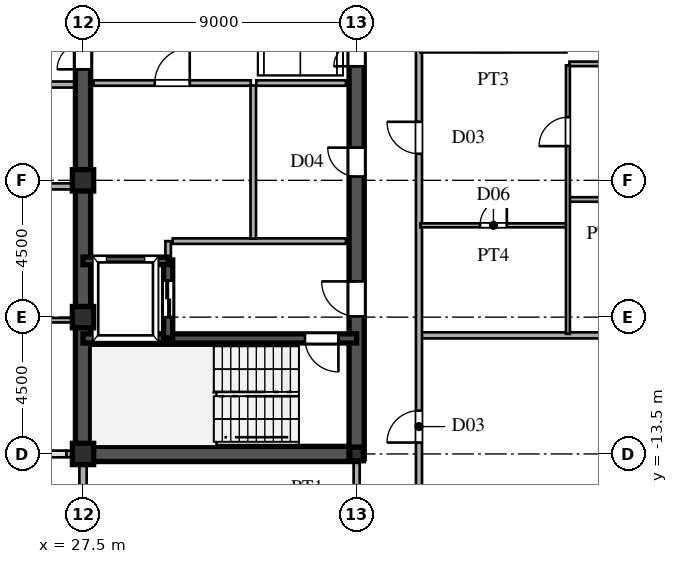
"""IFC4 building model, lengths in metres.
Left out: names, types, materials, properties, quantities, classifications, styles, units other than length and angle.
Written with IfcOpenShell. Run it as: python <this file> out.ifc"""

import sys

from ifc_helpers import new_model, si_unit, direction, frame, frame_2d, origin, origin_2d, place, context, subcontext, project, spatial, rectangle, hollow_rectangle, i_section, extrude, source, transform, mapped, element, fill, save


model = new_model("IFC4")
c1 = context("Model", 3, precision=1e-05, world=origin(), true_north=direction((0.0, 1.0)))
c2 = subcontext(c1, "Body", "Model", "MODEL_VIEW")
j1 = project(units=[si_unit("LENGTHUNIT", "METRE"), si_unit("PLANEANGLEUNIT", "RADIAN")], contexts=[c1])
p1 = place(None, origin())
s1 = spatial("IfcSite", under=j1, at=p1, CompositionType="ELEMENT")
p2 = place(p1, origin())
s2 = spatial("IfcBuilding", under=s1, at=p2, CompositionType="ELEMENT")
p3 = place(p2, frame((0.0, 0.0, 265.65)))
s3 = spatial("IfcBuildingStorey", under=s2, at=p3, CompositionType="ELEMENT", Elevation=265.65)
m1 = source(origin(), c2, "Body", "SweptSolid", [
    extrude(hollow_rectangle(XDim=0.7, YDim=0.7, WallThickness=0.03, at=origin_2d()), origin(), (0.0, 0.0, 1.0), 3.75),
])
for number, where, z_axis, x_axis in (
    (1, (27.5, -13.5, 0.0), (0.0, 0.0, 1.0), (1.0, 0.0, 0.0)),
    (2, (27.5, -9.0, 0.0), (0.0, 0.0, 1.0), (1.0, 0.0, 0.0)),
    (3, (27.5, -4.5, 0.0), (0.0, 0.0, 1.0), (1.0, 0.0, 0.0)),
):
    element("IfcColumn", number, at=place(p3, frame(where, z_axis=z_axis, x_axis=x_axis)), inside=s3, PredefinedType="COLUMN", context=c2, shape_type="MappedRepresentation", body=[
        mapped(m1, transform((0.0, 0.0, 0.0), scale=1.0)),
    ])
m2 = source(origin(), c2, "Body", "SweptSolid", [
    extrude(i_section(OverallWidth=0.45, OverallDepth=0.45, WebThickness=0.016, FlangeThickness=0.025, at=origin_2d()), origin(), (0.0, 0.0, 1.0), 3.75),
])
p4 = place(p3, frame((36.5, -13.5, 0.0), z_axis=(0.0, 0.0, 1.0), x_axis=(1.0, 0.0, 0.0)))
e4 = element("IfcColumn", 4, at=p4, inside=s3, PredefinedType="COLUMN", context=c2, shape_type="MappedRepresentation", body=[
    mapped(m2, transform((0.0, 0.0, 0.0), scale=1.0)),
])
p5 = place(p3, frame((27.5, -15.98, 0.0), z_axis=(0.0, 0.0, 1.0), x_axis=(0.0, 1.0, 0.0)))
e5 = element("IfcWall", 5, at=p5, inside=s3, PredefinedType="SOLIDWALL", context=c2, shape_type="SweptSolid", body=[
    extrude(rectangle(XDim=1.605, YDim=0.24, at=frame_2d((0.803, 0.0))), origin(), (0.0, 0.0, 1.0), 3.49),
])
p6 = place(p3, frame((27.5, -14.375, 0.0), z_axis=(0.0, 0.0, 1.0), x_axis=(0.0, 1.0, 0.0)))
e6 = element("IfcWall", 6, at=p6, inside=s3, PredefinedType="SOLIDWALL", context=c2, shape_type="SweptSolid", body=[
    extrude(rectangle(XDim=0.62, YDim=0.24, at=frame_2d((0.31, 0.0))), origin(), (0.0, 0.0, 1.0), 2.99),
])
p7 = place(p3, frame((26.95, -13.5, 0.0), z_axis=(0.0, 0.0, 1.0), x_axis=(1.0, 0.0, 0.0)))
e7 = element("IfcWall", 7, at=p7, inside=s3, PredefinedType="SOLIDWALL", context=c2, shape_type="SweptSolid", body=[
    extrude(rectangle(XDim=0.54, YDim=0.21, at=frame_2d((0.27, 0.0))), origin(), (0.0, 0.0, 1.0), 2.99),
])
p8 = place(p3, frame((27.5, -13.5, 0.0), z_axis=(0.0, 0.0, 1.0), x_axis=(0.0, 1.0, 0.0)))
e8 = element("IfcWall", 8, at=p8, inside=s3, PredefinedType="SHEAR", context=c2, shape_type="SweptSolid", body=[
    extrude(rectangle(XDim=12.2, YDim=0.5, at=frame_2d((6.1, 0.0))), origin(), (0.0, 0.0, 1.0), 3.49),
])
p9 = place(p3, frame((27.5, -1.3, 0.0), z_axis=(0.0, 0.0, 1.0), x_axis=(0.0, 1.0, 0.0)))
e9 = element("IfcWall", 9, at=p9, inside=s3, PredefinedType="SHEAR", context=c2, shape_type="SweptSolid", body=[
    extrude(rectangle(XDim=2.6, YDim=0.5, at=frame_2d((1.3, 0.0))), origin(), (0.0, 0.0, 1.0), 3.49),
])
p10 = place(p9, frame((0.45, 0.0, 0.0)))
e10 = element("IfcOpeningElement", 10, at=p10, cuts=e9, PredefinedType="OPENING", context=c2, shape_type="SweptSolid", body=[
    extrude(rectangle(XDim=1.7, YDim=2.35, at=frame_2d((0.85, 1.175))), frame((0.0, 0.26, 0.0), z_axis=(0.0, -1.0, 0.0), x_axis=(1.0, 0.0, 0.0)), (0.0, 0.0, 1.0), 0.52),
])
p11 = place(p3, frame((27.5, -13.5, 0.0), z_axis=(0.0, 0.0, 1.0), x_axis=(1.0, 0.0, 0.0)))
e11 = element("IfcWall", 11, at=p11, inside=s3, PredefinedType="SHEAR", context=c2, shape_type="SweptSolid", body=[
    extrude(rectangle(XDim=9.0, YDim=0.5, at=frame_2d((4.5, 0.0))), origin(), (0.0, 0.0, 1.0), 3.49),
])
p12 = place(p3, frame((36.5, -13.65, 0.0), z_axis=(0.0, 0.0, 1.0), x_axis=(0.0, 1.0, 0.0)))
e12 = element("IfcWall", 12, at=p12, inside=s3, PredefinedType="SHEAR", context=c2, shape_type="SweptSolid", body=[
    extrude(rectangle(XDim=7.15, YDim=0.5, at=frame_2d((3.575, 0.0))), origin(), (0.0, 0.0, 1.0), 3.49),
])
p13 = place(p12, frame((4.675, 0.0, 0.0)))
e13 = element("IfcOpeningElement", 13, at=p13, cuts=e12, PredefinedType="OPENING", context=c2, shape_type="SweptSolid", body=[
    extrude(rectangle(XDim=1.15, YDim=2.2, at=frame_2d((0.575, 1.1))), frame((0.0, 0.26, 0.0), z_axis=(0.0, -1.0, 0.0), x_axis=(1.0, 0.0, 0.0)), (0.0, 0.0, 1.0), 0.52),
])
p14 = place(p3, frame((36.5, -1.3, 0.0), z_axis=(0.0, 0.0, 1.0), x_axis=(0.0, 1.0, 0.0)))
e14 = element("IfcWall", 14, at=p14, inside=s3, PredefinedType="SHEAR", context=c2, shape_type="SweptSolid", body=[
    extrude(rectangle(XDim=2.6, YDim=0.5, at=frame_2d((1.3, 0.0))), origin(), (0.0, 0.0, 1.0), 3.49),
])
p15 = place(p14, frame((0.55, 0.0, 0.0)))
e15 = element("IfcOpeningElement", 15, at=p15, cuts=e14, PredefinedType="OPENING", context=c2, shape_type="SweptSolid", body=[
    extrude(rectangle(XDim=1.5, YDim=2.3, at=frame_2d((0.75, 1.15))), frame((0.0, 0.26, 0.0), z_axis=(0.0, -1.0, 0.0), x_axis=(1.0, 0.0, 0.0)), (0.0, 0.0, 1.0), 0.52),
])
p16 = place(p3, frame((36.5, -6.5, 0.0), z_axis=(0.0, 0.0, 1.0), x_axis=(0.0, 1.0, 0.0)))
e16 = element("IfcWall", 16, at=p16, inside=s3, PredefinedType="SHEAR", context=c2, shape_type="SweptSolid", body=[
    extrude(rectangle(XDim=5.2, YDim=0.5, at=frame_2d((2.6, 0.0))), origin(), (0.0, 0.0, 1.0), 3.49),
])
p17 = place(p16, frame((2.125, 0.0, 0.0)))
e17 = element("IfcOpeningElement", 17, at=p17, cuts=e16, PredefinedType="OPENING", context=c2, shape_type="SweptSolid", body=[
    extrude(rectangle(XDim=0.95, YDim=2.15, at=frame_2d((0.475, 1.075))), frame((0.0, 0.26, 0.0), z_axis=(0.0, -1.0, 0.0), x_axis=(1.0, 0.0, 0.0)), (0.0, 0.0, 1.0), 0.52),
])
p18 = place(p3, frame((27.5, -9.7, 0.0), z_axis=(0.0, 0.0, 1.0), x_axis=(1.0, 0.0, 0.0)))
e18 = element("IfcWall", 18, at=p18, inside=s3, PredefinedType="SHEAR", context=c2, shape_type="SweptSolid", body=[
    extrude(rectangle(XDim=9.0, YDim=0.3, at=frame_2d((4.5, 0.0))), origin(), (0.0, 0.0, 1.0), 3.49),
])
p19 = place(p18, frame((7.3, 0.0, 0.0)))
e19 = element("IfcOpeningElement", 19, at=p19, cuts=e18, PredefinedType="OPENING", context=c2, shape_type="SweptSolid", body=[
    extrude(rectangle(XDim=1.1, YDim=2.2, at=frame_2d((0.55, 1.1))), frame((0.0, 0.16, 0.0), z_axis=(0.0, -1.0, 0.0), x_axis=(1.0, 0.0, 0.0)), (0.0, 0.0, 1.0), 0.32),
])
p20 = place(p3, frame((27.5, -7.15, 0.0), z_axis=(0.0, 0.0, 1.0), x_axis=(1.0, 0.0, 0.0)))
e20 = element("IfcWall", 20, at=p20, inside=s3, PredefinedType="SHEAR", context=c2, shape_type="SweptSolid", body=[
    extrude(rectangle(XDim=2.8, YDim=0.25, at=frame_2d((1.4, 0.0))), origin(), (0.0, 0.0, 1.0), 3.49),
])
p21 = place(p3, frame((30.3, -9.68, 0.0), z_axis=(0.0, 0.0, 1.0), x_axis=(0.0, 1.0, 0.0)))
e21 = element("IfcWall", 21, at=p21, inside=s3, PredefinedType="SHEAR", context=c2, shape_type="SweptSolid", body=[
    extrude(rectangle(XDim=2.56, YDim=0.3, at=frame_2d((1.28, 0.0))), origin(), (0.0, 0.0, 1.0), 3.49),
])
p22 = place(p21, frame((0.68, 0.0, 0.0)))
e22 = element("IfcOpeningElement", 22, at=p22, cuts=e21, PredefinedType="OPENING", context=c2, shape_type="SweptSolid", body=[
    extrude(rectangle(XDim=1.2, YDim=2.25, at=frame_2d((0.6, 1.125))), frame((0.0, 0.16, 0.0), z_axis=(0.0, -1.0, 0.0), x_axis=(1.0, 0.0, 0.0)), (0.0, 0.0, 1.0), 0.32),
])
p23 = place(p3, frame((30.45, -6.5, 0.0), z_axis=(0.0, 0.0, 1.0), x_axis=(1.0, 0.0, 0.0)))
e23 = element("IfcWall", 23, at=p23, inside=s3, PredefinedType="PARTITIONING", context=c2, shape_type="SweptSolid", body=[
    extrude(rectangle(XDim=5.7, YDim=0.18, at=frame_2d((2.85, 0.0))), origin(), (0.0, 0.0, 1.0), 3.49),
])
p24 = place(p3, frame((30.3, -7.12, 0.0), z_axis=(0.0, 0.0, 1.0), x_axis=(0.0, 1.0, 0.0)))
e24 = element("IfcWall", 24, at=p24, inside=s3, PredefinedType="PARTITIONING", context=c2, shape_type="SweptSolid", body=[
    extrude(rectangle(XDim=0.62, YDim=0.18, at=frame_2d((0.31, 0.0))), origin(), (0.0, 0.0, 1.0), 3.49),
])
p25 = place(p3, frame((33.1, -6.42, 0.0), z_axis=(0.0, 0.0, 1.0), x_axis=(0.0, 1.0, 0.0)))
e25 = element("IfcWall", 25, at=p25, inside=s3, PredefinedType="PARTITIONING", context=c2, shape_type="SweptSolid", body=[
    extrude(rectangle(XDim=5.04, YDim=0.18, at=frame_2d((2.52, 0.0))), origin(), (0.0, 0.0, 1.0), 3.49),
])
p26 = place(p3, frame((27.85, -1.3, 0.0), z_axis=(0.0, 0.0, 1.0), x_axis=(1.0, 0.0, 0.0)))
e26 = element("IfcWall", 26, at=p26, inside=s3, PredefinedType="PARTITIONING", context=c2, shape_type="SweptSolid", body=[
    extrude(rectangle(XDim=5.17, YDim=0.18, at=frame_2d((2.585, 0.0))), origin(), (0.0, 0.0, 1.0), 3.49),
])
p27 = place(p26, frame((2.01, 0.0, 0.0)))
e27 = element("IfcOpeningElement", 27, at=p27, cuts=e26, PredefinedType="OPENING", context=c2, shape_type="SweptSolid", body=[
    extrude(rectangle(XDim=1.15, YDim=2.2, at=frame_2d((0.575, 1.1))), frame((0.0, 0.1, 0.0), z_axis=(0.0, -1.0, 0.0), x_axis=(1.0, 0.0, 0.0)), (0.0, 0.0, 1.0), 0.2),
])
p28 = place(p3, frame((33.2, -1.3, 0.0), z_axis=(0.0, 0.0, 1.0), x_axis=(1.0, 0.0, 0.0)))
e28 = element("IfcWall", 28, at=p28, inside=s3, PredefinedType="PARTITIONING", context=c2, shape_type="SweptSolid", body=[
    extrude(rectangle(XDim=2.95, YDim=0.18, at=frame_2d((1.475, 0.0))), origin(), (0.0, 0.0, 1.0), 3.49),
])
p29 = place(p3, frame((38.63, -9.6, 0.0), z_axis=(0.0, 0.0, 1.0), x_axis=(1.0, 0.0, 0.0)))
e29 = element("IfcWall", 29, at=p29, inside=s3, PredefinedType="PARTITIONING", context=c2, shape_type="SweptSolid", body=[
    extrude(rectangle(XDim=15.38, YDim=0.2, at=frame_2d((7.69, 0.0))), origin(), (0.0, 0.0, 1.0), 3.49),
])
p30 = place(p3, frame((4.585, -9.1, 0.0), z_axis=(0.0, 0.0, 1.0), x_axis=(1.0, 0.0, 0.0)))
e30 = element("IfcWall", 30, at=p30, inside=s3, PredefinedType="PARTITIONING", context=c2, shape_type="SweptSolid", body=[
    extrude(rectangle(XDim=22.66, YDim=0.15, at=frame_2d((11.33, 0.0))), origin(), (0.0, 0.0, 1.0), 3.49),
])
p31 = place(p30, frame((3.94, 0.0, 0.0)))
e31 = element("IfcOpeningElement", 31, at=p31, cuts=e30, PredefinedType="OPENING", context=c2, shape_type="SweptSolid", body=[
    extrude(rectangle(XDim=0.95, YDim=2.15, at=frame_2d((0.475, 1.075))), frame((0.0, 0.085, 0.0), z_axis=(0.0, -1.0, 0.0), x_axis=(1.0, 0.0, 0.0)), (0.0, 0.0, 1.0), 0.17),
])
p32 = place(p30, frame((11.94, 0.0, 0.0)))
e32 = element("IfcOpeningElement", 32, at=p32, cuts=e30, PredefinedType="OPENING", context=c2, shape_type="SweptSolid", body=[
    extrude(rectangle(XDim=0.95, YDim=2.15, at=frame_2d((0.475, 1.075))), frame((0.0, 0.085, 0.0), z_axis=(0.0, -1.0, 0.0), x_axis=(1.0, 0.0, 0.0)), (0.0, 0.0, 1.0), 0.17),
])
p33 = place(p30, frame((18.94, 0.0, 0.0)))
e33 = element("IfcOpeningElement", 33, at=p33, cuts=e30, PredefinedType="OPENING", context=c2, shape_type="SweptSolid", body=[
    extrude(rectangle(XDim=0.95, YDim=2.15, at=frame_2d((0.475, 1.075))), frame((0.0, 0.085, 0.0), z_axis=(0.0, -1.0, 0.0), x_axis=(1.0, 0.0, 0.0)), (0.0, 0.0, 1.0), 0.17),
])
p34 = place(p3, frame((38.6, -5.98, 0.0), z_axis=(0.0, 0.0, 1.0), x_axis=(1.0, 0.0, 0.0)))
e34 = element("IfcWall", 34, at=p34, inside=s3, PredefinedType="PARTITIONING", context=c2, shape_type="SweptSolid", body=[
    extrude(rectangle(XDim=4.8, YDim=0.13, at=frame_2d((2.4, 0.0))), origin(), (0.0, 0.0, 1.0), 3.49),
])
p35 = place(p34, frame((1.96, 0.0, 0.0)))
e35 = element("IfcOpeningElement", 35, at=p35, cuts=e34, PredefinedType="OPENING", context=c2, shape_type="SweptSolid", body=[
    extrude(rectangle(XDim=0.88, YDim=2.1, at=frame_2d((0.44, 1.05))), frame((0.0, 0.075, 0.0), z_axis=(0.0, -1.0, 0.0), x_axis=(1.0, 0.0, 0.0)), (0.0, 0.0, 1.0), 0.15),
])
p36 = place(p3, frame((43.5, -5.13, 0.0), z_axis=(0.0, 0.0, 1.0), x_axis=(1.0, 0.0, 0.0)))
e36 = element("IfcWall", 36, at=p36, inside=s3, PredefinedType="PARTITIONING", context=c2, shape_type="SweptSolid", body=[
    extrude(rectangle(XDim=17.98, YDim=0.15, at=frame_2d((8.99, 0.0))), origin(), (0.0, 0.0, 1.0), 3.49),
])
p37 = place(p36, frame((5.0, 0.0, 0.0)))
e37 = element("IfcOpeningElement", 37, at=p37, cuts=e36, PredefinedType="OPENING", context=c2, shape_type="SweptSolid", body=[
    extrude(rectangle(XDim=0.95, YDim=2.15, at=frame_2d((0.475, 1.075))), frame((0.0, 0.085, 0.0), z_axis=(0.0, -1.0, 0.0), x_axis=(1.0, 0.0, 0.0)), (0.0, 0.0, 1.0), 0.17),
])
p38 = place(p3, frame((-27.245, -4.7, 0.0), z_axis=(0.0, 0.0, 1.0), x_axis=(1.0, 0.0, 0.0)))
e38 = element("IfcWall", 38, at=p38, inside=s3, PredefinedType="PARTITIONING", context=c2, shape_type="SweptSolid", body=[
    extrude(rectangle(XDim=54.49, YDim=0.2, at=frame_2d((27.245, 0.0))), origin(), (0.0, 0.0, 1.0), 3.49),
])
p39 = place(p38, frame((22.47, 0.0, 0.0)))
e39 = element("IfcOpeningElement", 39, at=p39, cuts=e38, PredefinedType="OPENING", context=c2, shape_type="SweptSolid", body=[
    extrude(rectangle(XDim=1.05, YDim=2.25, at=frame_2d((0.525, 1.125))), frame((0.0, 0.11, 0.0), z_axis=(0.0, -1.0, 0.0), x_axis=(1.0, 0.0, 0.0)), (0.0, 0.0, 1.0), 0.22),
])
p40 = place(p3, frame((6.885, -1.35, 0.0), z_axis=(0.0, 0.0, 1.0), x_axis=(1.0, 0.0, 0.0)))
e40 = element("IfcWall", 40, at=p40, inside=s3, PredefinedType="PARTITIONING", context=c2, shape_type="SweptSolid", body=[
    extrude(rectangle(XDim=20.36, YDim=0.2, at=frame_2d((10.18, 0.0))), origin(), (0.0, 0.0, 1.0), 3.49),
])
p41 = place(p40, frame((6.34, 0.0, 0.0)))
e41 = element("IfcOpeningElement", 41, at=p41, cuts=e40, PredefinedType="OPENING", context=c2, shape_type="SweptSolid", body=[
    extrude(rectangle(XDim=1.05, YDim=2.25, at=frame_2d((0.525, 1.125))), frame((0.0, 0.11, 0.0), z_axis=(0.0, -1.0, 0.0), x_axis=(1.0, 0.0, 0.0)), (0.0, 0.0, 1.0), 0.22),
])
p42 = place(p3, frame((43.5, -0.67, 0.0), z_axis=(0.0, 0.0, 1.0), x_axis=(1.0, 0.0, 0.0)))
e42 = element("IfcWall", 42, at=p42, inside=s3, PredefinedType="PARTITIONING", context=c2, shape_type="SweptSolid", body=[
    extrude(rectangle(XDim=24.035, YDim=0.15, at=frame_2d((12.018, 0.0))), origin(), (0.0, 0.0, 1.0), 3.49),
])
p43 = place(p42, frame((5.0, 0.0, 0.0)))
e43 = element("IfcOpeningElement", 43, at=p43, cuts=e42, PredefinedType="OPENING", context=c2, shape_type="SweptSolid", body=[
    extrude(rectangle(XDim=0.95, YDim=2.15, at=frame_2d((0.475, 1.075))), frame((0.0, 0.085, 0.0), z_axis=(0.0, -1.0, 0.0), x_axis=(1.0, 0.0, 0.0)), (0.0, 0.0, 1.0), 0.17),
])
p44 = place(p3, frame((36.5, -15.515, 0.0), z_axis=(0.0, 0.0, 1.0), x_axis=(0.0, 1.0, 0.0)))
e44 = element("IfcWall", 44, at=p44, inside=s3, PredefinedType="PARTITIONING", context=c2, shape_type="SweptSolid", body=[
    extrude(rectangle(XDim=1.76, YDim=0.2, at=frame_2d((0.88, 0.0))), origin(), (0.0, 0.0, 1.0), 2.89),
])
p45 = place(p3, frame((38.55, -15.515, 0.0), z_axis=(0.0, 0.0, 1.0), x_axis=(0.0, 1.0, 0.0)))
e45 = element("IfcWall", 45, at=p45, inside=s3, PredefinedType="PARTITIONING", context=c2, shape_type="SweptSolid", body=[
    extrude(rectangle(XDim=31.03, YDim=0.2, at=frame_2d((15.515, 0.0))), origin(), (0.0, 0.0, 1.0), 3.49),
])
p46 = place(p45, frame((2.39, 0.0, 0.0)))
e46 = element("IfcOpeningElement", 46, at=p46, cuts=e45, PredefinedType="OPENING", context=c2, shape_type="SweptSolid", body=[
    extrude(rectangle(XDim=1.05, YDim=2.25, at=frame_2d((0.525, 1.125))), frame((0.0, 0.11, 0.0), z_axis=(0.0, -1.0, 0.0), x_axis=(1.0, 0.0, 0.0)), (0.0, 0.0, 1.0), 0.22),
])
p47 = place(p45, frame((11.889, 0.0, 0.0)))
e47 = element("IfcOpeningElement", 47, at=p47, cuts=e45, PredefinedType="OPENING", context=c2, shape_type="SweptSolid", body=[
    extrude(rectangle(XDim=1.05, YDim=2.25, at=frame_2d((0.525, 1.125))), frame((0.0, 0.11, 0.0), z_axis=(0.0, -1.0, 0.0), x_axis=(1.0, 0.0, 0.0)), (0.0, 0.0, 1.0), 0.22),
])
p48 = place(p45, frame((24.69, 0.0, 0.0)))
e48 = element("IfcOpeningElement", 48, at=p48, cuts=e45, PredefinedType="OPENING", context=c2, shape_type="SweptSolid", body=[
    extrude(rectangle(XDim=1.05, YDim=2.25, at=frame_2d((0.525, 1.125))), frame((0.0, 0.11, 0.0), z_axis=(0.0, -1.0, 0.0), x_axis=(1.0, 0.0, 0.0)), (0.0, 0.0, 1.0), 0.22),
])
p49 = place(p3, frame((43.45, -9.55, 0.0), z_axis=(0.0, 0.0, 1.0), x_axis=(0.0, 1.0, 0.0)))
e49 = element("IfcWall", 49, at=p49, inside=s3, PredefinedType="PARTITIONING", context=c2, shape_type="SweptSolid", body=[
    extrude(rectangle(XDim=8.833, YDim=0.13, at=frame_2d((4.417, 0.0))), origin(), (0.0, 0.0, 1.0), 3.49),
])
p50 = place(p49, frame((6.175, 0.0, 0.0)))
e50 = element("IfcOpeningElement", 50, at=p50, cuts=e49, PredefinedType="OPENING", context=c2, shape_type="SweptSolid", body=[
    extrude(rectangle(XDim=0.95, YDim=2.15, at=frame_2d((0.475, 1.075))), frame((0.0, 0.075, 0.0), z_axis=(0.0, -1.0, 0.0), x_axis=(1.0, 0.0, 0.0)), (0.0, 0.0, 1.0), 0.15),
])
m3 = source(origin(), c2, "Body", "SweptSolid", [
    extrude(rectangle(XDim=1.7, YDim=2.35, at=frame_2d((0.85, 1.175))), frame((0.0, 0.025, 0.0), z_axis=(0.0, -1.0, 0.0), x_axis=(1.0, 0.0, 0.0)), (0.0, 0.0, 1.0), 0.05),
])
p51 = place(p10, origin())
e51 = element("IfcDoor", 51, at=p51, inside=s3, OperationType="DOUBLE_SWING_LEFT", PredefinedType="DOOR", context=c2, shape_type="MappedRepresentation", body=[
    mapped(m3, transform((0.0, 0.0, 0.0), scale=1.0)),
])
fill(e10, e51)
m4 = source(origin(), c2, "Body", "SweptSolid", [
    extrude(rectangle(XDim=1.15, YDim=2.2, at=frame_2d((0.575, 1.1))), frame((0.0, 0.025, 0.0), z_axis=(0.0, -1.0, 0.0), x_axis=(1.0, 0.0, 0.0)), (0.0, 0.0, 1.0), 0.05),
])
p52 = place(p13, origin())
e52 = element("IfcDoor", 52, at=p52, inside=s3, OperationType="SINGLE_SWING_RIGHT", PredefinedType="DOOR", context=c2, shape_type="MappedRepresentation", body=[
    mapped(m4, transform((0.0, 0.0, 0.0), scale=1.0)),
])
fill(e13, e52)
m5 = source(origin(), c2, "Body", "SweptSolid", [
    extrude(rectangle(XDim=1.5, YDim=2.3, at=frame_2d((0.75, 1.15))), frame((0.0, 0.025, 0.0), z_axis=(0.0, -1.0, 0.0), x_axis=(1.0, 0.0, 0.0)), (0.0, 0.0, 1.0), 0.05),
])
p53 = place(p15, origin())
e53 = element("IfcDoor", 53, at=p53, inside=s3, OperationType="DOUBLE_SWING_LEFT", PredefinedType="DOOR", context=c2, shape_type="MappedRepresentation", body=[
    mapped(m5, transform((0.0, 0.0, 0.0), scale=1.0)),
])
fill(e15, e53)
m6 = source(origin(), c2, "Body", "SweptSolid", [
    extrude(rectangle(XDim=0.95, YDim=2.15, at=frame_2d((0.475, 1.075))), frame((0.0, 0.025, 0.0), z_axis=(0.0, -1.0, 0.0), x_axis=(1.0, 0.0, 0.0)), (0.0, 0.0, 1.0), 0.05),
])
p54 = place(p17, origin())
e54 = element("IfcDoor", 54, at=p54, inside=s3, OperationType="SINGLE_SWING_RIGHT", PredefinedType="DOOR", context=c2, shape_type="MappedRepresentation", body=[
    mapped(m6, transform((0.0, 0.0, 0.0), scale=1.0)),
])
fill(e17, e54)
m7 = source(origin(), c2, "Body", "SweptSolid", [
    extrude(rectangle(XDim=1.1, YDim=2.2, at=frame_2d((0.55, 1.1))), frame((0.0, 0.025, 0.0), z_axis=(0.0, -1.0, 0.0), x_axis=(1.0, 0.0, 0.0)), (0.0, 0.0, 1.0), 0.05),
])
p55 = place(p19, frame((1.1, 0.0, 0.0), z_axis=(0.0, 0.0, 1.0), x_axis=(-1.0, 0.0, 0.0)))
e55 = element("IfcDoor", 55, at=p55, inside=s3, OperationType="SINGLE_SWING_RIGHT", PredefinedType="DOOR", context=c2, shape_type="MappedRepresentation", body=[
    mapped(m7, transform((0.0, 0.0, 0.0), scale=1.0)),
])
fill(e19, e55)
m8 = source(origin(), c2, "Body", "SweptSolid", [
    extrude(rectangle(XDim=1.2, YDim=2.25, at=frame_2d((0.6, 1.125))), frame((0.0, 0.025, 0.0), z_axis=(0.0, -1.0, 0.0), x_axis=(1.0, 0.0, 0.0)), (0.0, 0.0, 1.0), 0.05),
])
p56 = place(p22, origin())
e56 = element("IfcDoor", 56, at=p56, inside=s3, OperationType="DOUBLE_DOOR_SLIDING", PredefinedType="DOOR", context=c2, shape_type="MappedRepresentation", body=[
    mapped(m8, transform((0.0, 0.0, 0.0), scale=1.0)),
])
fill(e22, e56)
p57 = place(p27, origin())
e57 = element("IfcDoor", 57, at=p57, inside=s3, OperationType="SINGLE_SWING_RIGHT", PredefinedType="DOOR", context=c2, shape_type="MappedRepresentation", body=[
    mapped(m4, transform((0.0, 0.0, 0.0), scale=1.0)),
])
fill(e27, e57)
m9 = source(origin(), c2, "Body", "SweptSolid", [
    extrude(rectangle(XDim=0.88, YDim=2.1, at=frame_2d((0.44, 1.05))), frame((0.0, 0.025, 0.0), z_axis=(0.0, -1.0, 0.0), x_axis=(1.0, 0.0, 0.0)), (0.0, 0.0, 1.0), 0.05),
])
p58 = place(p35, origin())
e58 = element("IfcDoor", 58, at=p58, inside=s3, OperationType="SINGLE_SWING_RIGHT", PredefinedType="DOOR", context=c2, shape_type="MappedRepresentation", body=[
    mapped(m9, transform((0.0, 0.0, 0.0), scale=1.0)),
])
fill(e35, e58)
m10 = source(origin(), c2, "Body", "SweptSolid", [
    extrude(rectangle(XDim=1.05, YDim=2.25, at=frame_2d((0.525, 1.125))), frame((0.0, 0.025, 0.0), z_axis=(0.0, -1.0, 0.0), x_axis=(1.0, 0.0, 0.0)), (0.0, 0.0, 1.0), 0.05),
])
p59 = place(p46, origin())
e59 = element("IfcDoor", 59, at=p59, inside=s3, OperationType="SINGLE_SWING_LEFT", PredefinedType="DOOR", context=c2, shape_type="MappedRepresentation", body=[
    mapped(m10, transform((0.0, 0.0, 0.0), scale=1.0)),
])
fill(e46, e59)
p60 = place(p47, origin())
e60 = element("IfcDoor", 60, at=p60, inside=s3, OperationType="SINGLE_SWING_RIGHT", PredefinedType="DOOR", context=c2, shape_type="MappedRepresentation", body=[
    mapped(m10, transform((0.0, 0.0, 0.0), scale=1.0)),
])
fill(e47, e60)
m11 = source(origin(), c2, "Body", "SweptSolid", [
    extrude(rectangle(XDim=0.95, YDim=2.15, at=frame_2d((0.475, 1.075))), frame((0.0, 0.025, 0.0), z_axis=(0.0, -1.0, 0.0), x_axis=(1.0, 0.0, 0.0)), (0.0, 0.0, 1.0), 0.05),
])
p61 = place(p50, origin())
e61 = element("IfcDoor", 61, at=p61, inside=s3, OperationType="SINGLE_SWING_LEFT", PredefinedType="DOOR", context=c2, shape_type="MappedRepresentation", body=[
    mapped(m11, transform((0.0, 0.0, 0.0), scale=1.0)),
])
fill(e50, e61)
save(model, sys.argv[1])
